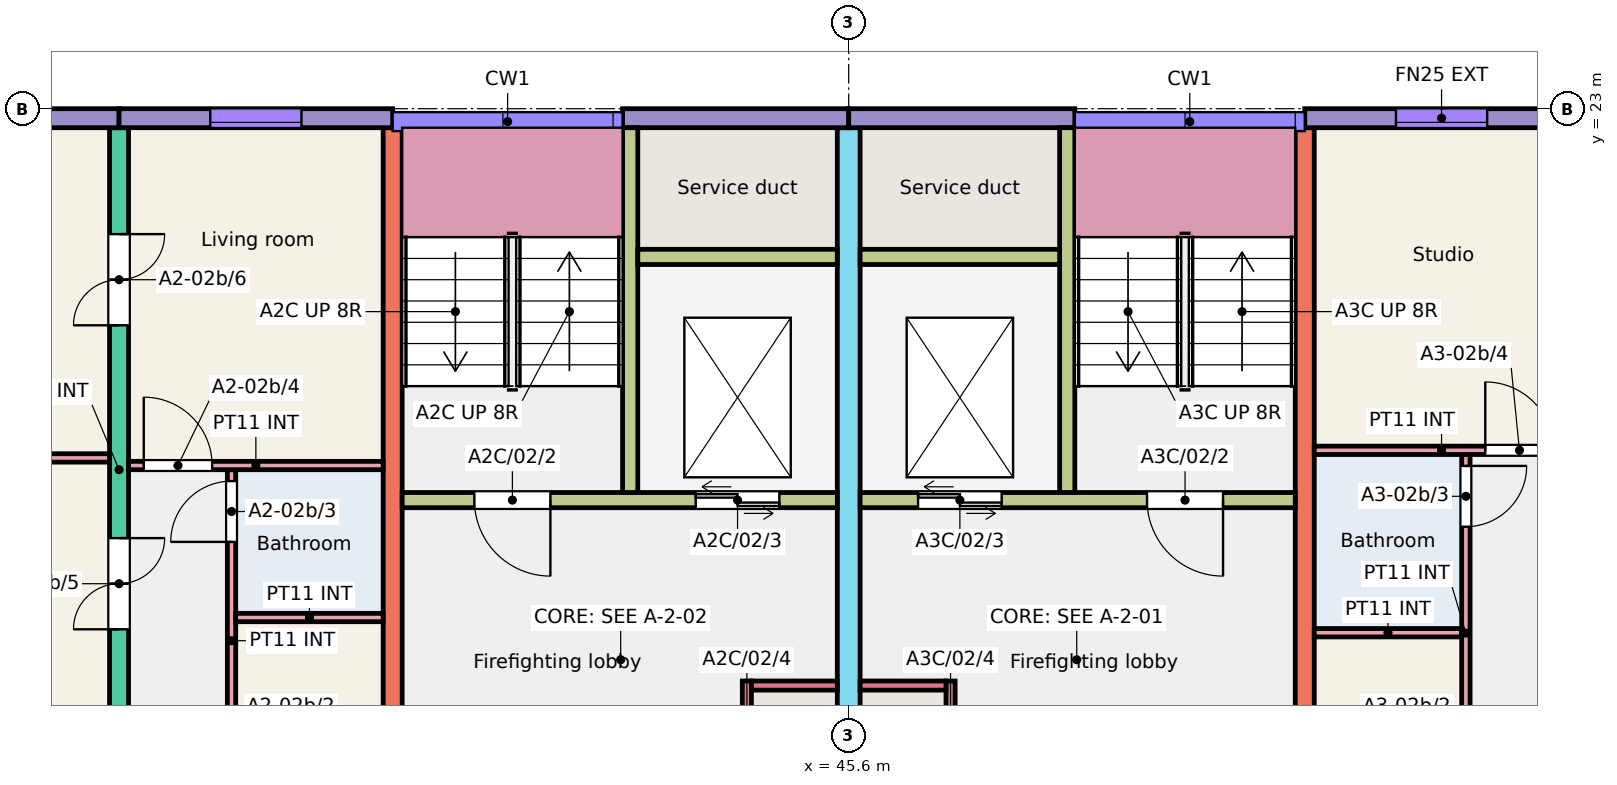
"""IFC4 building model, lengths in metres.
Left out: names, types, materials, properties, quantities, classifications, styles, units other than length and angle.
Written with IfcOpenShell. Run it as: python <this file> out.ifc"""

import sys

from ifc_helpers import new_model, si_unit, direction, frame, frame_2d, origin, place, context, subcontext, project, spatial, rectangle, extrude, element, fill, save


model = new_model("IFC4")
c1 = context("Model", 3, precision=1e-05, world=origin(), true_north=direction((0.0, 1.0)))
c2 = subcontext(c1, "Body", "Model", "MODEL_VIEW")
j1 = project(units=[si_unit("LENGTHUNIT", "METRE"), si_unit("PLANEANGLEUNIT", "RADIAN")], contexts=[c1])
p1 = place(None, origin())
s1 = spatial("IfcSite", under=j1, at=p1, CompositionType="ELEMENT")
p2 = place(p1, origin())
s2 = spatial("IfcBuilding", under=s1, at=p2, CompositionType="ELEMENT")
p3 = place(p2, frame((0.0, 0.0, 6.0)))
s3 = spatial("IfcBuildingStorey", under=s2, at=p3, CompositionType="ELEMENT", Elevation=6.0)
p4 = place(p3, frame((36.0, 13.75, 0.0), z_axis=(0.0, 0.0, 1.0), x_axis=(0.0, 1.0, 0.0)))
e1 = element("IfcWall", 1, at=p4, inside=s3, PredefinedType="SHEAR", context=c2, shape_type="SweptSolid", body=[
    extrude(rectangle(XDim=9.0, YDim=0.25, at=frame_2d((4.5, 0.0))), origin(), (0.0, 0.0, 1.0), 3.0),
])
p5 = place(p4, frame((2.4, 0.0, 0.0)))
e2 = element("IfcOpeningElement", 2, at=p5, cuts=e1, PredefinedType="OPENING", context=c2, shape_type="SweptSolid", body=[
    extrude(rectangle(XDim=1.2, YDim=2.1, at=frame_2d((0.6, 1.05))), frame((0.0, 0.135, 0.0), z_axis=(0.0, -1.0, 0.0), x_axis=(1.0, 0.0, 0.0)), (0.0, 0.0, 1.0), 0.27),
])
p6 = place(p4, frame((6.4, 0.0, 0.0)))
e3 = element("IfcOpeningElement", 3, at=p6, cuts=e1, PredefinedType="OPENING", context=c2, shape_type="SweptSolid", body=[
    extrude(rectangle(XDim=1.2, YDim=2.1, at=frame_2d((0.6, 1.05))), frame((0.0, 0.135, 0.0), z_axis=(0.0, -1.0, 0.0), x_axis=(1.0, 0.0, 0.0)), (0.0, 0.0, 1.0), 0.27),
])
p7 = place(p3, frame((39.6, 13.75, 0.0), z_axis=(0.0, 0.0, 1.0), x_axis=(0.0, 1.0, 0.0)))
e4 = element("IfcWall", 4, at=p7, inside=s3, PredefinedType="SHEAR", context=c2, shape_type="SweptSolid", body=[
    extrude(rectangle(XDim=9.0, YDim=0.25, at=frame_2d((4.5, 0.0))), origin(), (0.0, 0.0, 1.0), 3.0),
])
p8 = place(p3, frame((45.6, 11.75, 0.0), z_axis=(0.0, 0.0, 1.0), x_axis=(0.0, 1.0, 0.0)))
e5 = element("IfcWall", 5, at=p8, inside=s3, PredefinedType="SHEAR", context=c2, shape_type="SweptSolid", body=[
    extrude(rectangle(XDim=11.0, YDim=0.3, at=frame_2d((5.5, 0.0))), origin(), (0.0, 0.0, 1.0), 3.0),
])
p9 = place(p8, frame((0.3, 0.0, 0.0)))
e6 = element("IfcOpeningElement", 6, at=p9, cuts=e5, PredefinedType="OPENING", context=c2, shape_type="SweptSolid", body=[
    extrude(rectangle(XDim=1.2, YDim=2.1, at=frame_2d((0.6, 1.05))), frame((0.0, 0.16, 0.0), z_axis=(0.0, -1.0, 0.0), x_axis=(1.0, 0.0, 0.0)), (0.0, 0.0, 1.0), 0.32),
])
p10 = place(p3, frame((51.6, 13.75, 0.0), z_axis=(0.0, 0.0, 1.0), x_axis=(0.0, 1.0, 0.0)))
e7 = element("IfcWall", 7, at=p10, inside=s3, PredefinedType="SHEAR", context=c2, shape_type="SweptSolid", body=[
    extrude(rectangle(XDim=9.0, YDim=0.25, at=frame_2d((4.5, 0.0))), origin(), (0.0, 0.0, 1.0), 3.0),
])
p11 = place(p3, frame((32.4, 22.875, 0.0), z_axis=(0.0, 0.0, 1.0), x_axis=(1.0, 0.0, 0.0)))
e8 = element("IfcWall", 8, at=p11, inside=s3, PredefinedType="SOLIDWALL", context=c2, shape_type="SweptSolid", body=[
    extrude(rectangle(XDim=3.6, YDim=0.25, at=frame_2d((1.8, 0.0))), origin(), (0.0, 0.0, 1.0), 3.0),
])
p12 = place(p11, frame((1.2, 0.0, 0.8)))
e9 = element("IfcOpeningElement", 9, at=p12, cuts=e8, PredefinedType="OPENING", context=c2, shape_type="SweptSolid", body=[
    extrude(rectangle(XDim=1.2, YDim=1.6, at=frame_2d((0.6, 0.8))), frame((0.0, 0.135, 0.0), z_axis=(0.0, -1.0, 0.0), x_axis=(1.0, 0.0, 0.0)), (0.0, 0.0, 1.0), 0.27),
])
p13 = place(p3, frame((36.0, 22.875, 0.0), z_axis=(0.0, 0.0, 1.0), x_axis=(1.0, 0.0, 0.0)))
e10 = element("IfcWall", 10, at=p13, inside=s3, PredefinedType="SOLIDWALL", context=c2, shape_type="SweptSolid", body=[
    extrude(rectangle(XDim=3.6, YDim=0.25, at=frame_2d((1.8, 0.0))), origin(), (0.0, 0.0, 1.0), 3.0),
])
p14 = place(p13, frame((1.2, 0.0, 0.8)))
e11 = element("IfcOpeningElement", 11, at=p14, cuts=e10, PredefinedType="OPENING", context=c2, shape_type="SweptSolid", body=[
    extrude(rectangle(XDim=1.2, YDim=1.6, at=frame_2d((0.6, 0.8))), frame((0.0, 0.135, 0.0), z_axis=(0.0, -1.0, 0.0), x_axis=(1.0, 0.0, 0.0)), (0.0, 0.0, 1.0), 0.27),
])
p15 = place(p3, frame((42.625, 22.875, 0.0), z_axis=(0.0, 0.0, 1.0), x_axis=(1.0, 0.0, 0.0)))
e12 = element("IfcWall", 12, at=p15, inside=s3, PredefinedType="SOLIDWALL", context=c2, shape_type="SweptSolid", body=[
    extrude(rectangle(XDim=2.975, YDim=0.25, at=frame_2d((1.488, 0.0))), origin(), (0.0, 0.0, 1.0), 3.0),
])
p16 = place(p3, frame((39.725, 17.85, 0.0), z_axis=(0.0, 0.0, 1.0), x_axis=(1.0, 0.0, 0.0)))
e13 = element("IfcWall", 13, at=p16, inside=s3, PredefinedType="SHEAR", context=c2, shape_type="SweptSolid", body=[
    extrude(rectangle(XDim=5.725, YDim=0.2, at=frame_2d((2.862, 0.0))), origin(), (0.0, 0.0, 1.0), 3.0),
])
p17 = place(p16, frame((0.95, 0.0, 0.0)))
e14 = element("IfcOpeningElement", 14, at=p17, cuts=e13, PredefinedType="OPENING", context=c2, shape_type="SweptSolid", body=[
    extrude(rectangle(XDim=1.0, YDim=2.1, at=frame_2d((0.5, 1.05))), frame((0.0, 0.11, 0.0), z_axis=(0.0, -1.0, 0.0), x_axis=(1.0, 0.0, 0.0)), (0.0, 0.0, 1.0), 0.22),
])
p18 = place(p16, frame((3.863, 0.0, 0.0)))
e15 = element("IfcOpeningElement", 15, at=p18, cuts=e13, PredefinedType="OPENING", context=c2, shape_type="SweptSolid", body=[
    extrude(rectangle(XDim=1.1, YDim=2.1, at=frame_2d((0.55, 1.05))), frame((0.0, 0.11, 0.0), z_axis=(0.0, -1.0, 0.0), x_axis=(1.0, 0.0, 0.0)), (0.0, 0.0, 1.0), 0.22),
])
p19 = place(p3, frame((42.725, 17.95, 0.0), z_axis=(0.0, 0.0, 1.0), x_axis=(0.0, 1.0, 0.0)))
e16 = element("IfcWall", 16, at=p19, inside=s3, PredefinedType="SHEAR", context=c2, shape_type="SweptSolid", body=[
    extrude(rectangle(XDim=4.8, YDim=0.2, at=frame_2d((2.4, 0.0))), origin(), (0.0, 0.0, 1.0), 3.0),
])
p20 = place(p3, frame((42.825, 21.05, 0.0), z_axis=(0.0, 0.0, 1.0), x_axis=(1.0, 0.0, 0.0)))
e17 = element("IfcWall", 17, at=p20, inside=s3, PredefinedType="SHEAR", context=c2, shape_type="SweptSolid", body=[
    extrude(rectangle(XDim=2.625, YDim=0.2, at=frame_2d((1.312, 0.0))), origin(), (0.0, 0.0, 1.0), 3.0),
])
p21 = place(p3, frame((44.26, 13.75, 0.0), z_axis=(0.0, 0.0, 1.0), x_axis=(0.0, 1.0, 0.0)))
e18 = element("IfcWall", 18, at=p21, inside=s3, PredefinedType="SHEAR", context=c2, shape_type="SweptSolid", body=[
    extrude(rectangle(XDim=1.72, YDim=0.12, at=frame_2d((0.86, 0.0))), origin(), (0.0, 0.0, 1.0), 3.0),
])
p22 = place(p21, frame((0.45, 0.0, 0.0)))
e19 = element("IfcOpeningElement", 19, at=p22, cuts=e18, PredefinedType="OPENING", context=c2, shape_type="SweptSolid", body=[
    extrude(rectangle(XDim=0.9, YDim=2.1, at=frame_2d((0.45, 1.05))), frame((0.0, 0.07, 0.0), z_axis=(0.0, -1.0, 0.0), x_axis=(1.0, 0.0, 0.0)), (0.0, 0.0, 1.0), 0.14),
])
p23 = place(p3, frame((44.32, 15.41, 0.0), z_axis=(0.0, 0.0, 1.0), x_axis=(1.0, 0.0, 0.0)))
e20 = element("IfcWall", 20, at=p23, inside=s3, PredefinedType="SHEAR", context=c2, shape_type="SweptSolid", body=[
    extrude(rectangle(XDim=1.13, YDim=0.12, at=frame_2d((0.565, 0.0))), origin(), (0.0, 0.0, 1.0), 3.0),
])
p24 = place(p3, frame((45.6, 22.875, 0.0), z_axis=(0.0, 0.0, 1.0), x_axis=(1.0, 0.0, 0.0)))
e21 = element("IfcWall", 21, at=p24, inside=s3, PredefinedType="SOLIDWALL", context=c2, shape_type="SweptSolid", body=[
    extrude(rectangle(XDim=2.975, YDim=0.25, at=frame_2d((1.487, 0.0))), origin(), (0.0, 0.0, 1.0), 3.0),
])
p25 = place(p3, frame((45.75, 17.85, 0.0), z_axis=(0.0, 0.0, 1.0), x_axis=(1.0, 0.0, 0.0)))
e22 = element("IfcWall", 22, at=p25, inside=s3, PredefinedType="SHEAR", context=c2, shape_type="SweptSolid", body=[
    extrude(rectangle(XDim=5.725, YDim=0.2, at=frame_2d((2.863, 0.0))), origin(), (0.0, 0.0, 1.0), 3.0),
])
p26 = place(p25, frame((3.775, 0.0, 0.0)))
e23 = element("IfcOpeningElement", 23, at=p26, cuts=e22, PredefinedType="OPENING", context=c2, shape_type="SweptSolid", body=[
    extrude(rectangle(XDim=1.0, YDim=2.1, at=frame_2d((0.5, 1.05))), frame((0.0, 0.11, 0.0), z_axis=(0.0, -1.0, 0.0), x_axis=(1.0, 0.0, 0.0)), (0.0, 0.0, 1.0), 0.22),
])
p27 = place(p25, frame((0.762, 0.0, 0.0)))
e24 = element("IfcOpeningElement", 24, at=p27, cuts=e22, PredefinedType="OPENING", context=c2, shape_type="SweptSolid", body=[
    extrude(rectangle(XDim=1.1, YDim=2.1, at=frame_2d((0.55, 1.05))), frame((0.0, 0.11, 0.0), z_axis=(0.0, -1.0, 0.0), x_axis=(1.0, 0.0, 0.0)), (0.0, 0.0, 1.0), 0.22),
])
p28 = place(p3, frame((48.475, 17.95, 0.0), z_axis=(0.0, 0.0, 1.0), x_axis=(0.0, 1.0, 0.0)))
e25 = element("IfcWall", 25, at=p28, inside=s3, PredefinedType="SHEAR", context=c2, shape_type="SweptSolid", body=[
    extrude(rectangle(XDim=4.8, YDim=0.2, at=frame_2d((2.4, 0.0))), origin(), (0.0, 0.0, 1.0), 3.0),
])
p29 = place(p3, frame((45.75, 21.05, 0.0), z_axis=(0.0, 0.0, 1.0), x_axis=(1.0, 0.0, 0.0)))
e26 = element("IfcWall", 26, at=p29, inside=s3, PredefinedType="SHEAR", context=c2, shape_type="SweptSolid", body=[
    extrude(rectangle(XDim=2.625, YDim=0.2, at=frame_2d((1.312, 0.0))), origin(), (0.0, 0.0, 1.0), 3.0),
])
p30 = place(p3, frame((46.94, 13.75, 0.0), z_axis=(0.0, 0.0, 1.0), x_axis=(0.0, 1.0, 0.0)))
e27 = element("IfcWall", 27, at=p30, inside=s3, PredefinedType="SHEAR", context=c2, shape_type="SweptSolid", body=[
    extrude(rectangle(XDim=1.72, YDim=0.12, at=frame_2d((0.86, 0.0))), origin(), (0.0, 0.0, 1.0), 3.0),
])
p31 = place(p30, frame((0.45, 0.0, 0.0)))
e28 = element("IfcOpeningElement", 28, at=p31, cuts=e27, PredefinedType="OPENING", context=c2, shape_type="SweptSolid", body=[
    extrude(rectangle(XDim=0.9, YDim=2.1, at=frame_2d((0.45, 1.05))), frame((0.0, 0.07, 0.0), z_axis=(0.0, -1.0, 0.0), x_axis=(1.0, 0.0, 0.0)), (0.0, 0.0, 1.0), 0.14),
])
p32 = place(p3, frame((45.75, 15.41, 0.0), z_axis=(0.0, 0.0, 1.0), x_axis=(1.0, 0.0, 0.0)))
e29 = element("IfcWall", 29, at=p32, inside=s3, PredefinedType="SHEAR", context=c2, shape_type="SweptSolid", body=[
    extrude(rectangle(XDim=1.13, YDim=0.12, at=frame_2d((0.565, 0.0))), origin(), (0.0, 0.0, 1.0), 3.0),
])
p33 = place(p3, frame((51.6, 22.875, 0.0), z_axis=(0.0, 0.0, 1.0), x_axis=(1.0, 0.0, 0.0)))
e30 = element("IfcWall", 30, at=p33, inside=s3, PredefinedType="SOLIDWALL", context=c2, shape_type="SweptSolid", body=[
    extrude(rectangle(XDim=3.6, YDim=0.25, at=frame_2d((1.8, 0.0))), origin(), (0.0, 0.0, 1.0), 3.0),
])
p34 = place(p33, frame((1.2, 0.0, 0.8)))
e31 = element("IfcOpeningElement", 31, at=p34, cuts=e30, PredefinedType="OPENING", context=c2, shape_type="SweptSolid", body=[
    extrude(rectangle(XDim=1.2, YDim=1.6, at=frame_2d((0.6, 0.8))), frame((0.0, 0.135, 0.0), z_axis=(0.0, -1.0, 0.0), x_axis=(1.0, 0.0, 0.0)), (0.0, 0.0, 1.0), 0.27),
])
p35 = place(p3, frame((37.48, 13.75, 0.0), z_axis=(0.0, 0.0, 1.0), x_axis=(0.0, 1.0, 0.0)))
e32 = element("IfcWall", 32, at=p35, inside=s3, PredefinedType="PARTITIONING", context=c2, shape_type="SweptSolid", body=[
    extrude(rectangle(XDim=4.5, YDim=0.11, at=frame_2d((2.25, 0.0))), origin(), (0.0, 0.0, 1.0), 2.8),
])
p36 = place(p35, frame((0.2, 0.0, 0.0)))
e33 = element("IfcOpeningElement", 33, at=p36, cuts=e32, PredefinedType="OPENING", context=c2, shape_type="SweptSolid", body=[
    extrude(rectangle(XDim=0.8, YDim=2.1, at=frame_2d((0.4, 1.05))), frame((0.0, 0.065, 0.0), z_axis=(0.0, -1.0, 0.0), x_axis=(1.0, 0.0, 0.0)), (0.0, 0.0, 1.0), 0.13),
])
p37 = place(p35, frame((3.55, 0.0, 0.0)))
e34 = element("IfcOpeningElement", 34, at=p37, cuts=e32, PredefinedType="OPENING", context=c2, shape_type="SweptSolid", body=[
    extrude(rectangle(XDim=0.8, YDim=2.1, at=frame_2d((0.4, 1.05))), frame((0.0, 0.065, 0.0), z_axis=(0.0, -1.0, 0.0), x_axis=(1.0, 0.0, 0.0)), (0.0, 0.0, 1.0), 0.13),
])
p38 = place(p3, frame((37.535, 16.305, 0.0), z_axis=(0.0, 0.0, 1.0), x_axis=(1.0, 0.0, 0.0)))
e35 = element("IfcWall", 35, at=p38, inside=s3, PredefinedType="PARTITIONING", context=c2, shape_type="SweptSolid", body=[
    extrude(rectangle(XDim=1.94, YDim=0.11, at=frame_2d((0.97, 0.0))), origin(), (0.0, 0.0, 1.0), 2.8),
])
p39 = place(p3, frame((36.125, 18.305, 0.0), z_axis=(0.0, 0.0, 1.0), x_axis=(1.0, 0.0, 0.0)))
e36 = element("IfcWall", 36, at=p39, inside=s3, PredefinedType="PARTITIONING", context=c2, shape_type="SweptSolid", body=[
    extrude(rectangle(XDim=3.35, YDim=0.11, at=frame_2d((1.675, 0.0))), origin(), (0.0, 0.0, 1.0), 2.8),
])
p40 = place(p39, frame((0.2, 0.0, 0.0)))
e37 = element("IfcOpeningElement", 37, at=p40, cuts=e36, PredefinedType="OPENING", context=c2, shape_type="SweptSolid", body=[
    extrude(rectangle(XDim=0.9, YDim=2.1, at=frame_2d((0.45, 1.05))), frame((0.0, 0.065, 0.0), z_axis=(0.0, -1.0, 0.0), x_axis=(1.0, 0.0, 0.0)), (0.0, 0.0, 1.0), 0.13),
])
p41 = place(p3, frame((32.525, 18.405, 0.0), z_axis=(0.0, 0.0, 1.0), x_axis=(1.0, 0.0, 0.0)))
e38 = element("IfcWall", 38, at=p41, inside=s3, PredefinedType="PARTITIONING", context=c2, shape_type="SweptSolid", body=[
    extrude(rectangle(XDim=3.35, YDim=0.11, at=frame_2d((1.675, 0.0))), origin(), (0.0, 0.0, 1.0), 2.8),
])
p42 = place(p3, frame((51.725, 16.105, 0.0), z_axis=(0.0, 0.0, 1.0), x_axis=(1.0, 0.0, 0.0)))
e39 = element("IfcWall", 39, at=p42, inside=s3, PredefinedType="PARTITIONING", context=c2, shape_type="SweptSolid", body=[
    extrude(rectangle(XDim=1.94, YDim=0.11, at=frame_2d((0.97, 0.0))), origin(), (0.0, 0.0, 1.0), 2.8),
])
p43 = place(p3, frame((53.72, 13.75, 0.0), z_axis=(0.0, 0.0, 1.0), x_axis=(0.0, 1.0, 0.0)))
e40 = element("IfcWall", 40, at=p43, inside=s3, PredefinedType="PARTITIONING", context=c2, shape_type="SweptSolid", body=[
    extrude(rectangle(XDim=4.7, YDim=0.11, at=frame_2d((2.35, 0.0))), origin(), (0.0, 0.0, 1.0), 2.8),
])
p44 = place(p43, frame((0.2, 0.0, 0.0)))
e41 = element("IfcOpeningElement", 41, at=p44, cuts=e40, PredefinedType="OPENING", context=c2, shape_type="SweptSolid", body=[
    extrude(rectangle(XDim=0.8, YDim=2.1, at=frame_2d((0.4, 1.05))), frame((0.0, 0.065, 0.0), z_axis=(0.0, -1.0, 0.0), x_axis=(1.0, 0.0, 0.0)), (0.0, 0.0, 1.0), 0.13),
])
p45 = place(p43, frame((3.75, 0.0, 0.0)))
e42 = element("IfcOpeningElement", 42, at=p45, cuts=e40, PredefinedType="OPENING", context=c2, shape_type="SweptSolid", body=[
    extrude(rectangle(XDim=0.8, YDim=2.1, at=frame_2d((0.4, 1.05))), frame((0.0, 0.065, 0.0), z_axis=(0.0, -1.0, 0.0), x_axis=(1.0, 0.0, 0.0)), (0.0, 0.0, 1.0), 0.13),
])
p46 = place(p3, frame((51.725, 18.505, 0.0), z_axis=(0.0, 0.0, 1.0), x_axis=(1.0, 0.0, 0.0)))
e43 = element("IfcWall", 43, at=p46, inside=s3, PredefinedType="PARTITIONING", context=c2, shape_type="SweptSolid", body=[
    extrude(rectangle(XDim=3.35, YDim=0.11, at=frame_2d((1.675, 0.0))), origin(), (0.0, 0.0, 1.0), 2.8),
])
p47 = place(p46, frame((2.25, 0.0, 0.0)))
e44 = element("IfcOpeningElement", 44, at=p47, cuts=e43, PredefinedType="OPENING", context=c2, shape_type="SweptSolid", body=[
    extrude(rectangle(XDim=0.9, YDim=2.1, at=frame_2d((0.45, 1.05))), frame((0.0, 0.065, 0.0), z_axis=(0.0, -1.0, 0.0), x_axis=(1.0, 0.0, 0.0)), (0.0, 0.0, 1.0), 0.13),
])
p48 = place(p14, origin())
e45 = element("IfcWindow", 45, at=p48, inside=s3, PartitioningType="SINGLE_PANEL", PredefinedType="WINDOW", context=c2, shape_type="SweptSolid", body=[
    extrude(rectangle(XDim=1.2, YDim=1.6, at=frame_2d((0.6, 0.8))), frame((0.0, -0.025, 0.0), z_axis=(0.0, -1.0, 0.0), x_axis=(1.0, 0.0, 0.0)), (0.0, 0.0, 1.0), 0.06),
])
fill(e11, e45)
p49 = place(p34, origin())
e46 = element("IfcWindow", 46, at=p49, inside=s3, PartitioningType="SINGLE_PANEL", PredefinedType="WINDOW", context=c2, shape_type="SweptSolid", body=[
    extrude(rectangle(XDim=1.2, YDim=1.6, at=frame_2d((0.6, 0.8))), frame((0.0, -0.025, 0.0), z_axis=(0.0, -1.0, 0.0), x_axis=(1.0, 0.0, 0.0)), (0.0, 0.0, 1.0), 0.06),
])
fill(e31, e46)
p50 = place(p37, origin())
e47 = element("IfcDoor", 47, at=p50, inside=s3, OperationType="SINGLE_SWING_LEFT", PredefinedType="DOOR", context=c2, shape_type="SweptSolid", body=[
    extrude(rectangle(XDim=0.8, YDim=2.1, at=frame_2d((0.4, 1.05))), frame((0.0, 0.025, 0.0), z_axis=(0.0, -1.0, 0.0), x_axis=(1.0, 0.0, 0.0)), (0.0, 0.0, 1.0), 0.05),
])
fill(e34, e47)
p51 = place(p40, origin())
e48 = element("IfcDoor", 48, at=p51, inside=s3, OperationType="SINGLE_SWING_LEFT", PredefinedType="DOOR", context=c2, shape_type="SweptSolid", body=[
    extrude(rectangle(XDim=0.9, YDim=2.1, at=frame_2d((0.45, 1.05))), frame((0.0, 0.025, 0.0), z_axis=(0.0, -1.0, 0.0), x_axis=(1.0, 0.0, 0.0)), (0.0, 0.0, 1.0), 0.05),
])
fill(e37, e48)
p52 = place(p5, origin())
e49 = element("IfcDoor", 49, at=p52, inside=s3, OperationType="DOUBLE_DOOR_SINGLE_SWING", PredefinedType="DOOR", context=c2, shape_type="SweptSolid", body=[
    extrude(rectangle(XDim=1.2, YDim=2.1, at=frame_2d((0.6, 1.05))), frame((0.0, 0.025, 0.0), z_axis=(0.0, -1.0, 0.0), x_axis=(1.0, 0.0, 0.0)), (0.0, 0.0, 1.0), 0.05),
])
fill(e2, e49)
p53 = place(p6, origin())
e50 = element("IfcDoor", 50, at=p53, inside=s3, OperationType="DOUBLE_DOOR_SINGLE_SWING", PredefinedType="DOOR", context=c2, shape_type="SweptSolid", body=[
    extrude(rectangle(XDim=1.2, YDim=2.1, at=frame_2d((0.6, 1.05))), frame((0.0, 0.025, 0.0), z_axis=(0.0, -1.0, 0.0), x_axis=(1.0, 0.0, 0.0)), (0.0, 0.0, 1.0), 0.05),
])
fill(e3, e50)
p54 = place(p45, origin())
e51 = element("IfcDoor", 51, at=p54, inside=s3, OperationType="SINGLE_SWING_RIGHT", PredefinedType="DOOR", context=c2, shape_type="SweptSolid", body=[
    extrude(rectangle(XDim=0.8, YDim=2.1, at=frame_2d((0.4, 1.05))), frame((0.0, 0.025, 0.0), z_axis=(0.0, -1.0, 0.0), x_axis=(1.0, 0.0, 0.0)), (0.0, 0.0, 1.0), 0.05),
])
fill(e42, e51)
p55 = place(p47, origin())
e52 = element("IfcDoor", 52, at=p55, inside=s3, OperationType="SINGLE_SWING_LEFT", PredefinedType="DOOR", context=c2, shape_type="SweptSolid", body=[
    extrude(rectangle(XDim=0.9, YDim=2.1, at=frame_2d((0.45, 1.05))), frame((0.0, 0.025, 0.0), z_axis=(0.0, -1.0, 0.0), x_axis=(1.0, 0.0, 0.0)), (0.0, 0.0, 1.0), 0.05),
])
fill(e44, e52)
p56 = place(p17, origin())
e53 = element("IfcDoor", 53, at=p56, inside=s3, OperationType="SINGLE_SWING_RIGHT", PredefinedType="DOOR", context=c2, shape_type="SweptSolid", body=[
    extrude(rectangle(XDim=1.0, YDim=2.1, at=frame_2d((0.5, 1.05))), frame((0.0, 0.025, 0.0), z_axis=(0.0, -1.0, 0.0), x_axis=(1.0, 0.0, 0.0)), (0.0, 0.0, 1.0), 0.05),
])
fill(e14, e53)
p57 = place(p18, origin())
e54 = element("IfcDoor", 54, at=p57, inside=s3, OperationType="DOUBLE_DOOR_SLIDING", PredefinedType="DOOR", context=c2, shape_type="SweptSolid", body=[
    extrude(rectangle(XDim=1.1, YDim=2.1, at=frame_2d((0.55, 1.05))), frame((0.0, 0.025, 0.0), z_axis=(0.0, -1.0, 0.0), x_axis=(1.0, 0.0, 0.0)), (0.0, 0.0, 1.0), 0.05),
])
fill(e15, e54)
p58 = place(p26, origin())
e55 = element("IfcDoor", 55, at=p58, inside=s3, OperationType="SINGLE_SWING_RIGHT", PredefinedType="DOOR", context=c2, shape_type="SweptSolid", body=[
    extrude(rectangle(XDim=1.0, YDim=2.1, at=frame_2d((0.5, 1.05))), frame((0.0, 0.025, 0.0), z_axis=(0.0, -1.0, 0.0), x_axis=(1.0, 0.0, 0.0)), (0.0, 0.0, 1.0), 0.05),
])
fill(e23, e55)
p59 = place(p27, origin())
e56 = element("IfcDoor", 56, at=p59, inside=s3, OperationType="DOUBLE_DOOR_SLIDING", PredefinedType="DOOR", context=c2, shape_type="SweptSolid", body=[
    extrude(rectangle(XDim=1.1, YDim=2.1, at=frame_2d((0.55, 1.05))), frame((0.0, 0.025, 0.0), z_axis=(0.0, -1.0, 0.0), x_axis=(1.0, 0.0, 0.0)), (0.0, 0.0, 1.0), 0.05),
])
fill(e24, e56)
save(model, sys.argv[1])
